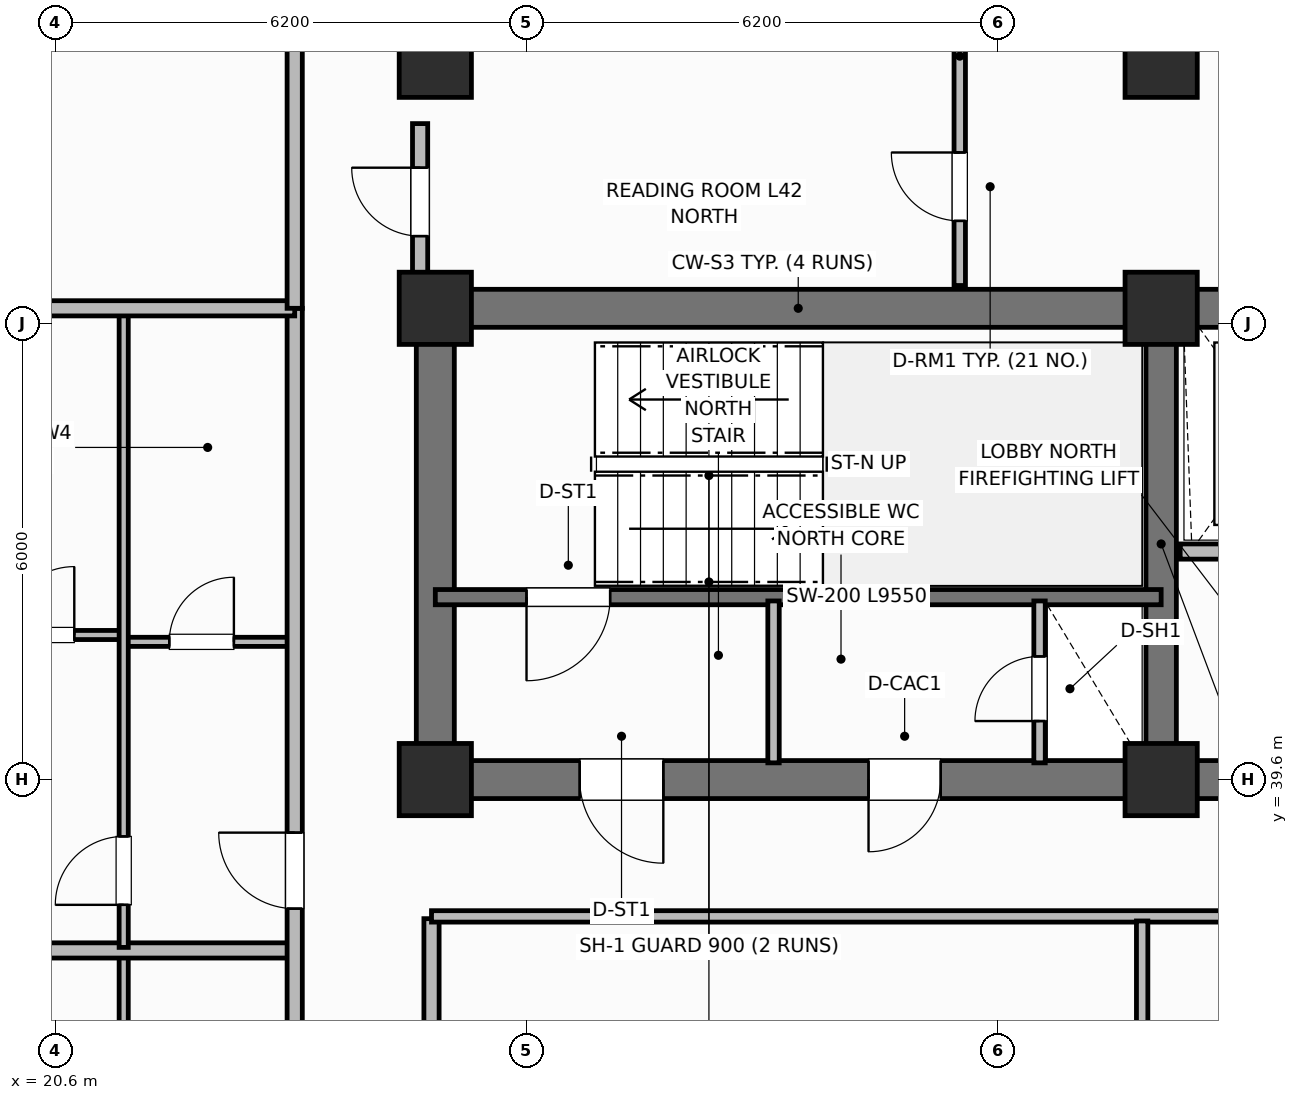
"""IFC4 building model, lengths in metres.
Left out: names, types, materials, properties, quantities, classifications, styles, units other than length and angle.
Written with IfcOpenShell. Run it as: python <this file> out.ifc"""

import sys

from ifc_helpers import new_model, si_unit, direction, frame, frame_2d, origin, origin_2d, place, context, subcontext, project, spatial, rectangle, extrude, element, fill, save


model = new_model("IFC4")
c1 = context("Model", 3, precision=1e-05, world=origin(), true_north=direction((0.0, 1.0)))
c2 = subcontext(c1, "Body", "Model", "MODEL_VIEW")
j1 = project(units=[si_unit("LENGTHUNIT", "METRE"), si_unit("PLANEANGLEUNIT", "RADIAN")], contexts=[c1])
p1 = place(None, origin())
s1 = spatial("IfcSite", under=j1, at=p1, CompositionType="ELEMENT")
p2 = place(p1, origin())
s2 = spatial("IfcBuilding", under=s1, at=p2, CompositionType="ELEMENT")
p3 = place(p2, frame((0.0, 0.0, 170.0)))
s3 = spatial("IfcBuildingStorey", under=s2, at=p3, CompositionType="ELEMENT", Elevation=170.0)
p4 = place(p3, frame((25.6, 45.8, 0.0), z_axis=(0.0, 0.0, 1.0), x_axis=(1.0, 0.0, 0.0)))
e1 = element("IfcWall", 1, at=p4, inside=s3, PredefinedType="SHEAR", context=c2, shape_type="SweptSolid", body=[
    extrude(rectangle(XDim=27.2, YDim=0.5, at=frame_2d((13.6, 0.0))), origin(), (0.0, 0.0, 1.0), 3.7),
])
p5 = place(p3, frame((25.6, 39.85, 0.0), z_axis=(0.0, 0.0, 1.0), x_axis=(0.0, 1.0, 0.0)))
e2 = element("IfcWall", 2, at=p5, inside=s3, PredefinedType="SHEAR", context=c2, shape_type="SweptSolid", body=[
    extrude(rectangle(XDim=5.7, YDim=0.5, at=frame_2d((2.85, 0.0))), origin(), (0.0, 0.0, 1.0), 3.7),
])
p6 = place(p3, frame((52.8, 39.6, 0.0), z_axis=(0.0, 0.0, 1.0), x_axis=(-1.0, 0.0, 0.0)))
e3 = element("IfcWall", 3, at=p6, inside=s3, PredefinedType="SHEAR", context=c2, shape_type="SweptSolid", body=[
    extrude(rectangle(XDim=27.2, YDim=0.5, at=frame_2d((13.6, 0.0))), origin(), (0.0, 0.0, 1.0), 3.7),
])
p7 = place(p6, frame((24.2, 0.0, 0.0)))
e4 = element("IfcOpeningElement", 4, at=p7, cuts=e3, PredefinedType="OPENING", context=c2, shape_type="SweptSolid", body=[
    extrude(rectangle(XDim=1.1, YDim=2.15, at=frame_2d((0.55, 1.075))), frame((0.0, 0.26, 0.0), z_axis=(0.0, -1.0, 0.0), x_axis=(1.0, 0.0, 0.0)), (0.0, 0.0, 1.0), 0.52),
])
p8 = place(p6, frame((20.55, 0.0, 0.0)))
e5 = element("IfcOpeningElement", 5, at=p8, cuts=e3, PredefinedType="OPENING", context=c2, shape_type="SweptSolid", body=[
    extrude(rectangle(XDim=0.95, YDim=2.1, at=frame_2d((0.475, 1.05))), frame((0.0, 0.26, 0.0), z_axis=(0.0, -1.0, 0.0), x_axis=(1.0, 0.0, 0.0)), (0.0, 0.0, 1.0), 0.52),
])
p9 = place(p6, frame((15.1, 0.0, 0.0)))
e6 = element("IfcOpeningElement", 6, at=p9, cuts=e3, PredefinedType="OPENING", context=c2, shape_type="SweptSolid", body=[
    extrude(rectangle(XDim=1.2, YDim=2.15, at=frame_2d((0.6, 1.075))), frame((0.0, 0.26, 0.0), z_axis=(0.0, -1.0, 0.0), x_axis=(1.0, 0.0, 0.0)), (0.0, 0.0, 1.0), 0.52),
])
p10 = place(p6, frame((13.05, 0.0, 0.0)))
e7 = element("IfcOpeningElement", 7, at=p10, cuts=e3, PredefinedType="OPENING", context=c2, shape_type="SweptSolid", body=[
    extrude(rectangle(XDim=0.85, YDim=2.1, at=frame_2d((0.425, 1.05))), frame((0.0, 0.26, 0.0), z_axis=(0.0, -1.0, 0.0), x_axis=(1.0, 0.0, 0.0)), (0.0, 0.0, 1.0), 0.52),
])
p11 = place(p6, frame((11.0, 0.0, 0.0)))
e8 = element("IfcOpeningElement", 8, at=p11, cuts=e3, PredefinedType="OPENING", context=c2, shape_type="SweptSolid", body=[
    extrude(rectangle(XDim=0.85, YDim=2.1, at=frame_2d((0.425, 1.05))), frame((0.0, 0.26, 0.0), z_axis=(0.0, -1.0, 0.0), x_axis=(1.0, 0.0, 0.0)), (0.0, 0.0, 1.0), 0.52),
])
p12 = place(p6, frame((7.35, 0.0, 0.0)))
e9 = element("IfcOpeningElement", 9, at=p12, cuts=e3, PredefinedType="OPENING", context=c2, shape_type="SweptSolid", body=[
    extrude(rectangle(XDim=0.85, YDim=2.1, at=frame_2d((0.425, 1.05))), frame((0.0, 0.26, 0.0), z_axis=(0.0, -1.0, 0.0), x_axis=(1.0, 0.0, 0.0)), (0.0, 0.0, 1.0), 0.52),
])
p13 = place(p6, frame((4.8, 0.0, 0.0)))
e10 = element("IfcOpeningElement", 10, at=p13, cuts=e3, PredefinedType="OPENING", context=c2, shape_type="SweptSolid", body=[
    extrude(rectangle(XDim=0.85, YDim=2.1, at=frame_2d((0.425, 1.05))), frame((0.0, 0.26, 0.0), z_axis=(0.0, -1.0, 0.0), x_axis=(1.0, 0.0, 0.0)), (0.0, 0.0, 1.0), 0.52),
])
p14 = place(p6, frame((1.9, 0.0, 0.0)))
e11 = element("IfcOpeningElement", 11, at=p14, cuts=e3, PredefinedType="OPENING", context=c2, shape_type="SweptSolid", body=[
    extrude(rectangle(XDim=0.85, YDim=2.1, at=frame_2d((0.425, 1.05))), frame((0.0, 0.26, 0.0), z_axis=(0.0, -1.0, 0.0), x_axis=(1.0, 0.0, 0.0)), (0.0, 0.0, 1.0), 0.52),
])
p15 = place(p3, frame((35.15, 39.85, 0.0), z_axis=(0.0, 0.0, 1.0), x_axis=(0.0, 1.0, 0.0)))
e12 = element("IfcWall", 12, at=p15, inside=s3, PredefinedType="SHEAR", context=c2, shape_type="SweptSolid", body=[
    extrude(rectangle(XDim=5.7, YDim=0.4, at=frame_2d((2.85, 0.0))), origin(), (0.0, 0.0, 1.0), 3.7),
])
for number, where, z_axis, x_axis in (
    (13, (25.6, 39.6, 0.0), (0.0, 0.0, 1.0), (1.0, 0.0, 0.0)),
    (14, (25.6, 45.8, 0.0), (0.0, 0.0, 1.0), (1.0, 0.0, 0.0)),
    (15, (35.15, 39.6, 0.0), (0.0, 0.0, 1.0), (1.0, 0.0, 0.0)),
    (16, (35.15, 45.8, 0.0), (0.0, 0.0, 1.0), (1.0, 0.0, 0.0)),
    (17, (25.6, 49.05, 0.0), (0.0, 0.0, 1.0), (1.0, 0.0, 0.0)),
    (18, (35.15, 49.05, 0.0), (0.0, 0.0, 1.0), (1.0, 0.0, 0.0)),
):
    element("IfcColumn", number, at=place(p3, frame(where, z_axis=z_axis, x_axis=x_axis)), inside=s3, PredefinedType="COLUMN", context=c2, shape_type="SweptSolid", body=[
        extrude(rectangle(XDim=0.95, YDim=0.95, at=origin_2d()), origin(), (0.0, 0.0, 1.0), 3.7),
    ])
p16 = place(p3, frame((35.15, 42.0, 0.0), z_axis=(0.0, 0.0, 1.0), x_axis=(-1.0, 0.0, 0.0)))
e19 = element("IfcWall", 19, at=p16, inside=s3, PredefinedType="SHEAR", context=c2, shape_type="SweptSolid", body=[
    extrude(rectangle(XDim=9.55, YDim=0.2, at=frame_2d((4.775, 0.0))), origin(), (0.0, 0.0, 1.0), 3.7),
])
p17 = place(p16, frame((7.25, 0.0, 0.0)))
e20 = element("IfcOpeningElement", 20, at=p17, cuts=e19, PredefinedType="OPENING", context=c2, shape_type="SweptSolid", body=[
    extrude(rectangle(XDim=1.1, YDim=2.15, at=frame_2d((0.55, 1.075))), frame((0.0, 0.11, 0.0), z_axis=(0.0, -1.0, 0.0), x_axis=(1.0, 0.0, 0.0)), (0.0, 0.0, 1.0), 0.22),
])
p18 = place(p3, frame((33.55, 39.82, 0.0), z_axis=(0.0, 0.0, 1.0), x_axis=(0.0, 1.0, 0.0)))
e21 = element("IfcWall", 21, at=p18, inside=s3, PredefinedType="PARTITIONING", context=c2, shape_type="SweptSolid", body=[
    extrude(rectangle(XDim=2.13, YDim=0.15, at=frame_2d((1.065, 0.0))), origin(), (0.0, 0.0, 1.0), 2.55),
])
p19 = place(p18, frame((0.55, 0.0, 0.0)))
e22 = element("IfcOpeningElement", 22, at=p19, cuts=e21, PredefinedType="OPENING", context=c2, shape_type="SweptSolid", body=[
    extrude(rectangle(XDim=0.85, YDim=2.05, at=frame_2d((0.425, 1.025))), frame((0.0, 0.085, 0.0), z_axis=(0.0, -1.0, 0.0), x_axis=(1.0, 0.0, 0.0)), (0.0, 0.0, 1.0), 0.17),
])
p20 = place(p3, frame((30.05, 39.82, 0.0), z_axis=(0.0, 0.0, 1.0), x_axis=(0.0, 1.0, 0.0)))
e23 = element("IfcWall", 23, at=p20, inside=s3, PredefinedType="PARTITIONING", context=c2, shape_type="SweptSolid", body=[
    extrude(rectangle(XDim=2.13, YDim=0.15, at=frame_2d((1.065, 0.0))), origin(), (0.0, 0.0, 1.0), 2.55),
])
p21 = place(p3, frame((37.95, 42.6, 0.0), z_axis=(0.0, 0.0, 1.0), x_axis=(-1.0, 0.0, 0.0)))
e24 = element("IfcWall", 24, at=p21, inside=s3, PredefinedType="PARTITIONING", context=c2, shape_type="SweptSolid", body=[
    extrude(rectangle(XDim=2.55, YDim=0.2, at=frame_2d((1.275, 0.0))), origin(), (0.0, 0.0, 1.0), 2.32),
])
p22 = place(p21, frame((0.75, 0.0, 0.0)))
e25 = element("IfcOpeningElement", 25, at=p22, cuts=e24, PredefinedType="OPENING", context=c2, shape_type="SweptSolid", body=[
    extrude(rectangle(XDim=1.1, YDim=2.15, at=frame_2d((0.55, 1.075))), frame((0.0, 0.11, 0.0), z_axis=(0.0, -1.0, 0.0), x_axis=(1.0, 0.0, 0.0)), (0.0, 0.0, 1.0), 0.22),
])
p23 = place(p3, frame((25.55, 18.63, 0.0), z_axis=(0.0, 0.0, 1.0), x_axis=(0.0, 1.0, 0.0)))
e26 = element("IfcWall", 26, at=p23, inside=s3, PredefinedType="PARTITIONING", context=c2, shape_type="SweptSolid", body=[
    extrude(rectangle(XDim=19.14, YDim=0.2, at=frame_2d((9.57, 0.0))), origin(), (0.0, 0.0, 1.0), 2.55),
])
p24 = place(p3, frame((25.55, 37.8, 0.0), z_axis=(0.0, 0.0, 1.0), x_axis=(1.0, 0.0, 0.0)))
e27 = element("IfcWall", 27, at=p24, inside=s3, PredefinedType="PARTITIONING", context=c2, shape_type="SweptSolid", body=[
    extrude(rectangle(XDim=22.2, YDim=0.15, at=frame_2d((11.1, 0.0))), origin(), (0.0, 0.0, 1.0), 2.55),
])
p25 = place(p3, frame((34.9, 18.66, 0.0), z_axis=(0.0, 0.0, 1.0), x_axis=(0.0, 1.0, 0.0)))
e28 = element("IfcWall", 28, at=p25, inside=s3, PredefinedType="PARTITIONING", context=c2, shape_type="SweptSolid", body=[
    extrude(rectangle(XDim=19.08, YDim=0.15, at=frame_2d((9.54, 0.0))), origin(), (0.0, 0.0, 1.0), 2.55),
])
p26 = place(p25, frame((5.0, 0.0, 0.0)))
e29 = element("IfcOpeningElement", 29, at=p26, cuts=e28, PredefinedType="OPENING", context=c2, shape_type="SweptSolid", body=[
    extrude(rectangle(XDim=1.0, YDim=2.15, at=frame_2d((0.5, 1.075))), frame((0.0, 0.085, 0.0), z_axis=(0.0, -1.0, 0.0), x_axis=(1.0, 0.0, 0.0)), (0.0, 0.0, 1.0), 0.17),
])
p27 = place(p3, frame((21.5, 29.84, 0.0), z_axis=(0.0, 0.0, 1.0), x_axis=(0.0, 1.0, 0.0)))
e30 = element("IfcWall", 30, at=p27, inside=s3, PredefinedType="PARTITIONING", context=c2, shape_type="SweptSolid", body=[
    extrude(rectangle(XDim=7.472, YDim=0.12, at=frame_2d((3.736, 0.0))), origin(), (0.0, 0.0, 1.0), 2.55),
])
p28 = place(p27, frame((0.61, 0.0, 0.0)))
e31 = element("IfcOpeningElement", 31, at=p28, cuts=e30, PredefinedType="OPENING", context=c2, shape_type="SweptSolid", body=[
    extrude(rectangle(XDim=0.9, YDim=2.1, at=frame_2d((0.45, 1.05))), frame((0.0, 0.07, 0.0), z_axis=(0.0, -1.0, 0.0), x_axis=(1.0, 0.0, 0.0)), (0.0, 0.0, 1.0), 0.14),
])
p29 = place(p3, frame((16.57, 37.352, 0.0), z_axis=(0.0, 0.0, 1.0), x_axis=(1.0, 0.0, 0.0)))
e32 = element("IfcWall", 32, at=p29, inside=s3, PredefinedType="PARTITIONING", context=c2, shape_type="SweptSolid", body=[
    extrude(rectangle(XDim=7.18, YDim=0.2, at=frame_2d((3.59, 0.0))), origin(), (0.0, 0.0, 1.0), 2.55),
])
p30 = place(p3, frame((21.5, 41.412, 0.0), z_axis=(0.0, 0.0, 1.0), x_axis=(1.0, 0.0, 0.0)))
e33 = element("IfcWall", 33, at=p30, inside=s3, PredefinedType="PARTITIONING", context=c2, shape_type="SweptSolid", body=[
    extrude(rectangle(XDim=2.25, YDim=0.12, at=frame_2d((1.125, 0.0))), origin(), (0.0, 0.0, 1.0), 2.55),
])
p31 = place(p30, frame((0.6, 0.0, 0.0)))
e34 = element("IfcOpeningElement", 34, at=p31, cuts=e33, PredefinedType="OPENING", context=c2, shape_type="SweptSolid", body=[
    extrude(rectangle(XDim=0.85, YDim=2.1, at=frame_2d((0.425, 1.05))), frame((0.0, 0.07, 0.0), z_axis=(0.0, -1.0, 0.0), x_axis=(1.0, 0.0, 0.0)), (0.0, 0.0, 1.0), 0.14),
])
p32 = place(p3, frame((16.57, 41.502, 0.0), z_axis=(0.0, 0.0, 1.0), x_axis=(1.0, 0.0, 0.0)))
e35 = element("IfcWall", 35, at=p32, inside=s3, PredefinedType="PARTITIONING", context=c2, shape_type="SweptSolid", body=[
    extrude(rectangle(XDim=4.93, YDim=0.12, at=frame_2d((2.465, 0.0))), origin(), (0.0, 0.0, 1.0), 2.55),
])
p33 = place(p32, frame((3.38, 0.0, 0.0)))
e36 = element("IfcOpeningElement", 36, at=p33, cuts=e35, PredefinedType="OPENING", context=c2, shape_type="SweptSolid", body=[
    extrude(rectangle(XDim=0.9, YDim=2.1, at=frame_2d((0.45, 1.05))), frame((0.0, 0.07, 0.0), z_axis=(0.0, -1.0, 0.0), x_axis=(1.0, 0.0, 0.0)), (0.0, 0.0, 1.0), 0.14),
])
p34 = place(p3, frame((21.5, 37.392, 0.0), z_axis=(0.0, 0.0, 1.0), x_axis=(0.0, 1.0, 0.0)))
e37 = element("IfcWall", 37, at=p34, inside=s3, PredefinedType="PARTITIONING", context=c2, shape_type="SweptSolid", body=[
    extrude(rectangle(XDim=8.368, YDim=0.12, at=frame_2d((4.184, 0.0))), origin(), (0.0, 0.0, 1.0), 2.55),
])
p35 = place(p34, frame((0.56, 0.0, 0.0)))
e38 = element("IfcOpeningElement", 38, at=p35, cuts=e37, PredefinedType="OPENING", context=c2, shape_type="SweptSolid", body=[
    extrude(rectangle(XDim=0.9, YDim=2.1, at=frame_2d((0.45, 1.05))), frame((0.0, 0.07, 0.0), z_axis=(0.0, -1.0, 0.0), x_axis=(1.0, 0.0, 0.0)), (0.0, 0.0, 1.0), 0.14),
])
p36 = place(p3, frame((23.75, 10.6, 0.0), z_axis=(0.0, 0.0, 1.0), x_axis=(0.0, 1.0, 0.0)))
e39 = element("IfcWall", 39, at=p36, inside=s3, PredefinedType="PARTITIONING", context=c2, shape_type="SweptSolid", body=[
    extrude(rectangle(XDim=35.2, YDim=0.2, at=frame_2d((17.6, 0.0))), origin(), (0.0, 0.0, 1.0), 2.55),
])
p37 = place(p36, frame((2.65, 0.0, 0.0)))
e40 = element("IfcOpeningElement", 40, at=p37, cuts=e39, PredefinedType="OPENING", context=c2, shape_type="SweptSolid", body=[
    extrude(rectangle(XDim=1.0, YDim=2.15, at=frame_2d((0.5, 1.075))), frame((0.0, 0.11, 0.0), z_axis=(0.0, -1.0, 0.0), x_axis=(1.0, 0.0, 0.0)), (0.0, 0.0, 1.0), 0.22),
])
p38 = place(p36, frame((11.4, 0.0, 0.0)))
e41 = element("IfcOpeningElement", 41, at=p38, cuts=e39, PredefinedType="OPENING", context=c2, shape_type="SweptSolid", body=[
    extrude(rectangle(XDim=1.0, YDim=2.15, at=frame_2d((0.5, 1.075))), frame((0.0, 0.11, 0.0), z_axis=(0.0, -1.0, 0.0), x_axis=(1.0, 0.0, 0.0)), (0.0, 0.0, 1.0), 0.22),
])
p39 = place(p36, frame((21.37, 0.0, 0.0)))
e42 = element("IfcOpeningElement", 42, at=p39, cuts=e39, PredefinedType="OPENING", context=c2, shape_type="SweptSolid", body=[
    extrude(rectangle(XDim=1.0, YDim=2.15, at=frame_2d((0.5, 1.075))), frame((0.0, 0.11, 0.0), z_axis=(0.0, -1.0, 0.0), x_axis=(1.0, 0.0, 0.0)), (0.0, 0.0, 1.0), 0.22),
])
p40 = place(p36, frame((27.302, 0.0, 0.0)))
e43 = element("IfcOpeningElement", 43, at=p40, cuts=e39, PredefinedType="OPENING", context=c2, shape_type="SweptSolid", body=[
    extrude(rectangle(XDim=1.0, YDim=2.15, at=frame_2d((0.5, 1.075))), frame((0.0, 0.11, 0.0), z_axis=(0.0, -1.0, 0.0), x_axis=(1.0, 0.0, 0.0)), (0.0, 0.0, 1.0), 0.22),
])
p41 = place(p3, frame((16.99, 45.8, 0.0), z_axis=(0.0, 0.0, 1.0), x_axis=(1.0, 0.0, 0.0)))
e44 = element("IfcWall", 44, at=p41, inside=s3, PredefinedType="PARTITIONING", context=c2, shape_type="SweptSolid", body=[
    extrude(rectangle(XDim=6.76, YDim=0.2, at=frame_2d((3.38, 0.0))), origin(), (0.0, 0.0, 1.0), 2.55),
])
p42 = place(p3, frame((23.75, 45.8, 0.0), z_axis=(0.0, 0.0, 1.0), x_axis=(0.0, 1.0, 0.0)))
e45 = element("IfcWall", 45, at=p42, inside=s3, PredefinedType="PARTITIONING", context=c2, shape_type="SweptSolid", body=[
    extrude(rectangle(XDim=3.73, YDim=0.2, at=frame_2d((1.865, 0.0))), origin(), (0.0, 0.0, 1.0), 2.55),
])
p43 = place(p3, frame((32.5, 46.1, 0.0), z_axis=(0.0, 0.0, 1.0), x_axis=(0.0, 1.0, 0.0)))
e46 = element("IfcWall", 46, at=p43, inside=s3, PredefinedType="PARTITIONING", context=c2, shape_type="SweptSolid", body=[
    extrude(rectangle(XDim=3.43, YDim=0.15, at=frame_2d((1.715, 0.0))), origin(), (0.0, 0.0, 1.0), 2.55),
])
p44 = place(p43, frame((0.85, 0.0, 0.0)))
e47 = element("IfcOpeningElement", 47, at=p44, cuts=e46, PredefinedType="OPENING", context=c2, shape_type="SweptSolid", body=[
    extrude(rectangle(XDim=0.9, YDim=2.1, at=frame_2d((0.45, 1.05))), frame((0.0, 0.085, 0.0), z_axis=(0.0, -1.0, 0.0), x_axis=(1.0, 0.0, 0.0)), (0.0, 0.0, 1.0), 0.17),
])
p45 = place(p3, frame((25.4, 46.1, 0.0), z_axis=(0.0, 0.0, 1.0), x_axis=(0.0, 1.0, 0.0)))
e48 = element("IfcWall", 48, at=p45, inside=s3, PredefinedType="PARTITIONING", context=c2, shape_type="SweptSolid", body=[
    extrude(rectangle(XDim=2.13, YDim=0.2, at=frame_2d((1.065, 0.0))), origin(), (0.0, 0.0, 1.0), 2.55),
])
p46 = place(p45, frame((0.65, 0.0, 0.0)))
e49 = element("IfcOpeningElement", 49, at=p46, cuts=e48, PredefinedType="OPENING", context=c2, shape_type="SweptSolid", body=[
    extrude(rectangle(XDim=0.9, YDim=2.1, at=frame_2d((0.45, 1.05))), frame((0.0, 0.11, 0.0), z_axis=(0.0, -1.0, 0.0), x_axis=(1.0, 0.0, 0.0)), (0.0, 0.0, 1.0), 0.22),
])
p47 = place(p17, origin())
e50 = element("IfcDoor", 50, at=p47, inside=s3, OperationType="SINGLE_SWING_RIGHT", PredefinedType="DOOR", context=c2, shape_type="SweptSolid", body=[
    extrude(rectangle(XDim=1.1, YDim=2.15, at=frame_2d((0.55, 1.075))), frame((0.0, 0.025, 0.0), z_axis=(0.0, -1.0, 0.0), x_axis=(1.0, 0.0, 0.0)), (0.0, 0.0, 1.0), 0.05),
])
fill(e20, e50)
p48 = place(p19, origin())
e51 = element("IfcDoor", 51, at=p48, inside=s3, OperationType="SINGLE_SWING_LEFT", PredefinedType="TRAPDOOR", context=c2, shape_type="SweptSolid", body=[
    extrude(rectangle(XDim=0.85, YDim=2.05, at=frame_2d((0.425, 1.025))), frame((0.0, 0.025, 0.0), z_axis=(0.0, -1.0, 0.0), x_axis=(1.0, 0.0, 0.0)), (0.0, 0.0, 1.0), 0.05),
])
fill(e22, e51)
p49 = place(p31, origin())
e52 = element("IfcDoor", 52, at=p49, inside=s3, OperationType="SINGLE_SWING_RIGHT", PredefinedType="DOOR", context=c2, shape_type="SweptSolid", body=[
    extrude(rectangle(XDim=0.85, YDim=2.1, at=frame_2d((0.425, 1.05))), frame((0.0, 0.025, 0.0), z_axis=(0.0, -1.0, 0.0), x_axis=(1.0, 0.0, 0.0)), (0.0, 0.0, 1.0), 0.05),
])
fill(e34, e52)
p50 = place(p33, origin())
e53 = element("IfcDoor", 53, at=p50, inside=s3, OperationType="SINGLE_SWING_RIGHT", PredefinedType="DOOR", context=c2, shape_type="SweptSolid", body=[
    extrude(rectangle(XDim=0.9, YDim=2.1, at=frame_2d((0.45, 1.05))), frame((0.0, 0.025, 0.0), z_axis=(0.0, -1.0, 0.0), x_axis=(1.0, 0.0, 0.0)), (0.0, 0.0, 1.0), 0.05),
])
fill(e36, e53)
p51 = place(p35, origin())
e54 = element("IfcDoor", 54, at=p51, inside=s3, OperationType="SINGLE_SWING_LEFT", PredefinedType="DOOR", context=c2, shape_type="SweptSolid", body=[
    extrude(rectangle(XDim=0.9, YDim=2.1, at=frame_2d((0.45, 1.05))), frame((0.0, 0.025, 0.0), z_axis=(0.0, -1.0, 0.0), x_axis=(1.0, 0.0, 0.0)), (0.0, 0.0, 1.0), 0.05),
])
fill(e38, e54)
p52 = place(p40, origin())
e55 = element("IfcDoor", 55, at=p52, inside=s3, OperationType="SINGLE_SWING_RIGHT", PredefinedType="DOOR", context=c2, shape_type="SweptSolid", body=[
    extrude(rectangle(XDim=1.0, YDim=2.15, at=frame_2d((0.5, 1.075))), frame((0.0, 0.025, 0.0), z_axis=(0.0, -1.0, 0.0), x_axis=(1.0, 0.0, 0.0)), (0.0, 0.0, 1.0), 0.05),
])
fill(e43, e55)
p53 = place(p44, origin())
e56 = element("IfcDoor", 56, at=p53, inside=s3, OperationType="SINGLE_SWING_RIGHT", PredefinedType="DOOR", context=c2, shape_type="SweptSolid", body=[
    extrude(rectangle(XDim=0.9, YDim=2.1, at=frame_2d((0.45, 1.05))), frame((0.0, 0.025, 0.0), z_axis=(0.0, -1.0, 0.0), x_axis=(1.0, 0.0, 0.0)), (0.0, 0.0, 1.0), 0.05),
])
fill(e47, e56)
p54 = place(p46, origin())
e57 = element("IfcDoor", 57, at=p54, inside=s3, OperationType="SINGLE_SWING_RIGHT", PredefinedType="DOOR", context=c2, shape_type="SweptSolid", body=[
    extrude(rectangle(XDim=0.9, YDim=2.1, at=frame_2d((0.45, 1.05))), frame((0.0, 0.025, 0.0), z_axis=(0.0, -1.0, 0.0), x_axis=(1.0, 0.0, 0.0)), (0.0, 0.0, 1.0), 0.05),
])
fill(e49, e57)
p55 = place(p7, origin())
e58 = element("IfcDoor", 58, at=p55, inside=s3, OperationType="SINGLE_SWING_LEFT", PredefinedType="DOOR", context=c2, shape_type="SweptSolid", body=[
    extrude(rectangle(XDim=1.1, YDim=2.15, at=frame_2d((0.55, 1.075))), frame((0.0, 0.025, 0.0), z_axis=(0.0, -1.0, 0.0), x_axis=(1.0, 0.0, 0.0)), (0.0, 0.0, 1.0), 0.05),
])
fill(e4, e58)
p56 = place(p8, origin())
e59 = element("IfcDoor", 59, at=p56, inside=s3, OperationType="SINGLE_SWING_RIGHT", PredefinedType="DOOR", context=c2, shape_type="SweptSolid", body=[
    extrude(rectangle(XDim=0.95, YDim=2.1, at=frame_2d((0.475, 1.05))), frame((0.0, 0.025, 0.0), z_axis=(0.0, -1.0, 0.0), x_axis=(1.0, 0.0, 0.0)), (0.0, 0.0, 1.0), 0.05),
])
fill(e5, e59)
save(model, sys.argv[1])
